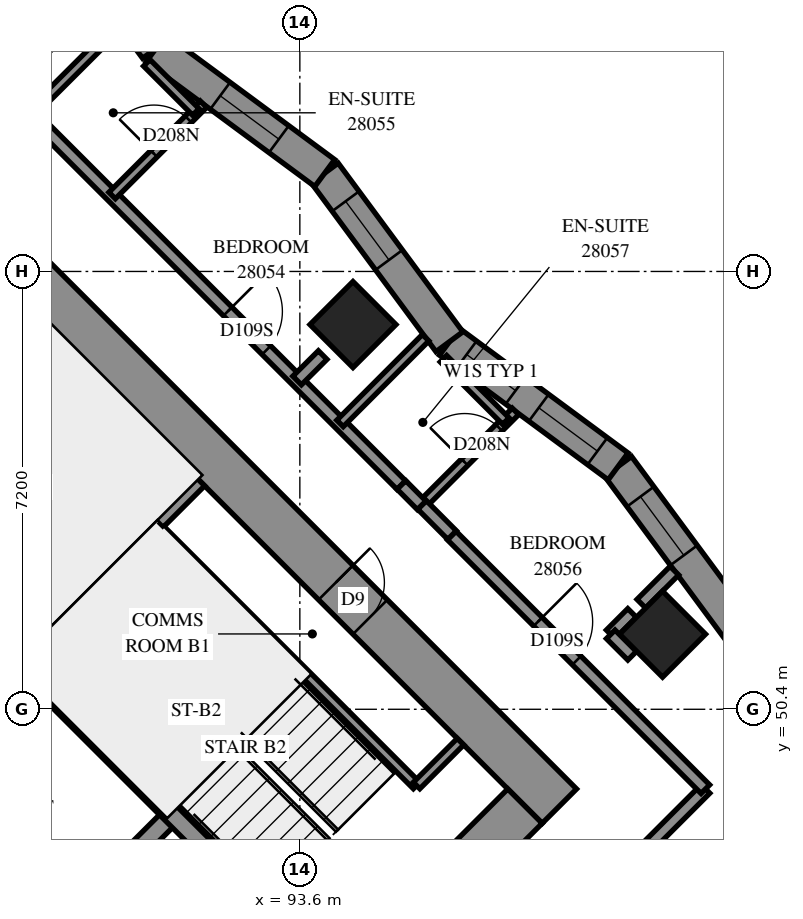
"""IFC4 building model, lengths in metres.
Left out: names, types, materials, properties, quantities, classifications, styles, units other than length and angle.
Written with IfcOpenShell. Run it as: python <this file> out.ifc"""

import sys

from ifc_helpers import new_model, si_unit, direction, frame, frame_2d, origin, origin_2d, place, context, subcontext, project, spatial, polyline, rectangle, outline, extrude, element, fill, save


model = new_model("IFC4")
c1 = context("Model", 3, precision=1e-05, world=origin(), true_north=direction((0.0, 1.0)))
c2 = subcontext(c1, "Body", "Model", "MODEL_VIEW")
j1 = project(units=[si_unit("LENGTHUNIT", "METRE"), si_unit("PLANEANGLEUNIT", "RADIAN")], contexts=[c1])
p1 = place(None, origin())
s1 = spatial("IfcSite", under=j1, at=p1, CompositionType="ELEMENT")
p2 = place(p1, origin())
s2 = spatial("IfcBuilding", under=s1, at=p2, CompositionType="ELEMENT")
p3 = place(p2, frame((0.0, 0.0, 105.0)))
s3 = spatial("IfcBuildingStorey", under=s2, at=p3, CompositionType="ELEMENT", Elevation=105.0)
for number, where, z_axis, x_axis in (
    (1, (89.382, 61.818, 0.0), (0.0, 0.0, 1.0), (0.707, -0.707, 0.0)),
    (2, (94.474, 56.727, 0.0), (0.0, 0.0, 1.0), (0.707, -0.707, 0.0)),
    (3, (99.565, 51.635, 0.0), (0.0, 0.0, 1.0), (0.707, -0.707, 0.0)),
):
    element("IfcColumn", number, at=place(p3, frame(where, z_axis=z_axis, x_axis=x_axis)), inside=s3, PredefinedType="COLUMN", context=c2, shape_type="SweptSolid", body=[
        extrude(rectangle(XDim=1.0, YDim=1.0, at=origin_2d()), origin(), (0.0, 0.0, 1.0), 3.1),
    ])
p4 = place(p3, frame((86.554, 60.121, -0.3), z_axis=(0.0, 0.0, 1.0), x_axis=(0.7071067812, -0.7071067812, 0.0)))
e4 = element("IfcWall", 4, at=p4, inside=s3, PredefinedType="SHEAR", context=c2, shape_type="SweptSolid", body=[
    extrude(rectangle(XDim=16.0, YDim=0.8, at=frame_2d((8.0, 0.0))), origin(), (0.0, 0.0, 1.0), 2.7),
])
p5 = place(p4, frame((10.8, 0.0, 0.3)))
e5 = element("IfcOpeningElement", 5, at=p5, cuts=e4, PredefinedType="OPENING", context=c2, shape_type="SweptSolid", body=[
    extrude(rectangle(XDim=0.8, YDim=2.1, at=frame_2d((0.4, 1.05))), frame((0.0, 0.41, 0.0), z_axis=(0.0, -1.0, 0.0), x_axis=(1.0, 0.0, 0.0)), (0.0, 0.0, 1.0), 0.82),
])
p6 = place(p3, frame((87.12, 38.625, -0.3), z_axis=(0.0, 0.0, 1.0), x_axis=(0.7071067812, 0.7071067812, 0.0)))
e6 = element("IfcWall", 6, at=p6, inside=s3, PredefinedType="SHEAR", context=c2, shape_type="SweptSolid", body=[
    extrude(rectangle(XDim=14.4, YDim=0.8, at=frame_2d((7.2, 0.0))), origin(), (0.0, 0.0, 1.0), 2.7),
])
p7 = place(p6, frame((4.55, 0.0, 0.3)))
e7 = element("IfcOpeningElement", 7, at=p7, cuts=e6, PredefinedType="OPENING", context=c2, shape_type="SweptSolid", body=[
    extrude(rectangle(XDim=1.1, YDim=2.1, at=frame_2d((0.55, 1.05))), frame((0.0, 0.41, 0.0), z_axis=(0.0, -1.0, 0.0), x_axis=(1.0, 0.0, 0.0)), (0.0, 0.0, 1.0), 0.82),
])
p8 = place(p6, frame((11.35, 0.0, 0.3)))
e8 = element("IfcOpeningElement", 8, at=p8, cuts=e6, PredefinedType="OPENING", context=c2, shape_type="SweptSolid", body=[
    extrude(rectangle(XDim=1.1, YDim=2.1, at=frame_2d((0.55, 1.05))), frame((0.0, 0.41, 0.0), z_axis=(0.0, -1.0, 0.0), x_axis=(1.0, 0.0, 0.0)), (0.0, 0.0, 1.0), 0.82),
])
p9 = place(p3, frame((89.17, 46.332, 0.0), z_axis=(0.0, 0.0, 1.0), x_axis=(0.7071067812, 0.7071067812, 0.0)))
e9 = element("IfcWall", 9, at=p9, inside=s3, PredefinedType="SOLIDWALL", context=c2, shape_type="SweptSolid", body=[
    extrude(rectangle(XDim=3.3, YDim=0.3, at=frame_2d((1.65, 0.0))), origin(), (0.0, 0.0, 1.0), 3.1),
])
p10 = place(p3, frame((81.534, 53.969, 0.0), z_axis=(0.0, 0.0, 1.0), x_axis=(0.707103309, -0.7071102534, 0.0)))
e10 = element("IfcWall", 10, at=p10, inside=s3, PredefinedType="SOLIDWALL", context=c2, shape_type="SweptSolid", body=[
    extrude(rectangle(XDim=14.4, YDim=0.3, at=frame_2d((7.2, 0.0))), origin(), (0.0, 0.0, 1.0), 3.1),
])
p11 = place(p10, frame((12.05, 0.0, 0.0)))
e11 = element("IfcOpeningElement", 11, at=p11, cuts=e10, PredefinedType="OPENING", context=c2, shape_type="SweptSolid", body=[
    extrude(rectangle(XDim=1.1, YDim=2.1, at=frame_2d((0.55, 1.05))), frame((0.0, 0.16, 0.0), z_axis=(0.0, -1.0, 0.0), x_axis=(1.0, 0.0, 0.0)), (0.0, 0.0, 1.0), 0.32),
])
p12 = place(p3, frame((88.958, 51.211, 0.0), z_axis=(0.0, 0.0, 1.0), x_axis=(0.7070998367, -0.7071137256, 0.0)))
e12 = element("IfcWall", 12, at=p12, inside=s3, PredefinedType="SOLIDWALL", context=c2, shape_type="SweptSolid", body=[
    extrude(rectangle(XDim=7.2, YDim=0.3, at=frame_2d((3.6, 0.0))), origin(), (0.0, 0.0, 1.0), 3.1),
])
p13 = place(p3, frame((88.958, 51.211, 0.0), z_axis=(0.0, 0.0, 1.0), x_axis=(0.7071067812, 0.7071067812, 0.0)))
e13 = element("IfcWall", 13, at=p13, inside=s3, PredefinedType="SOLIDWALL", context=c2, shape_type="SweptSolid", body=[
    extrude(rectangle(XDim=4.2, YDim=0.3, at=frame_2d((2.1, 0.0))), origin(), (0.0, 0.0, 1.0), 3.1),
])
p14 = place(p3, frame((100.884, 51.62, 0.0), z_axis=(0.0, 0.0, 1.0), x_axis=(-0.5943168833, 0.8042309632, 0.0)))
e14 = element("IfcWall", 14, at=p14, inside=s3, PredefinedType="SOLIDWALL", context=c2, shape_type="SweptSolid", body=[
    extrude(outline(polyline([(0.041, -0.275), (3.491, -0.275), (3.408, 0.275), (-0.041, 0.275), (0.041, -0.275)])), origin(), (0.0, 0.0, 1.0), 3.1),
])
p15 = place(p14, frame((1.631, 0.0, 0.5)))
e15 = element("IfcOpeningElement", 15, at=p15, cuts=e14, PredefinedType="OPENING", context=c2, shape_type="SweptSolid", body=[
    extrude(rectangle(XDim=1.2, YDim=2.45, at=frame_2d((0.6, 1.225))), frame((0.0, 0.285, 0.0), z_axis=(0.0, -1.0, 0.0), x_axis=(1.0, 0.0, 0.0)), (0.0, 0.0, 1.0), 0.57),
])
p16 = place(p3, frame((98.834, 54.394, 0.0), z_axis=(0.0, 0.0, 1.0), x_axis=(-0.8042309632, 0.5943168833, 0.0)))
e16 = element("IfcWall", 16, at=p16, inside=s3, PredefinedType="SOLIDWALL", context=c2, shape_type="SweptSolid", body=[
    extrude(outline(polyline([(-0.041, -0.275), (3.408, -0.275), (3.491, 0.275), (0.041, 0.275), (-0.041, -0.275)])), origin(), (0.0, 0.0, 1.0), 3.1),
])
p17 = place(p16, frame((0.422, 0.0, 0.5)))
e17 = element("IfcOpeningElement", 17, at=p17, cuts=e16, PredefinedType="OPENING", context=c2, shape_type="SweptSolid", body=[
    extrude(rectangle(XDim=1.2, YDim=2.45, at=frame_2d((0.6, 1.225))), frame((0.0, 0.285, 0.0), z_axis=(0.0, -1.0, 0.0), x_axis=(1.0, 0.0, 0.0)), (0.0, 0.0, 1.0), 0.57),
])
p18 = place(p16, frame((2.097, 0.0, 0.45)))
e18 = element("IfcOpeningElement", 18, at=p18, cuts=e16, PredefinedType="OPENING", context=c2, shape_type="SweptSolid", body=[
    extrude(rectangle(XDim=1.0, YDim=2.5, at=frame_2d((0.5, 1.25))), frame((0.0, 0.285, 0.0), z_axis=(0.0, -1.0, 0.0), x_axis=(1.0, 0.0, 0.0)), (0.0, 0.0, 1.0), 0.57),
])
p19 = place(p3, frame((96.06, 56.444, 0.0), z_axis=(0.0, 0.0, 1.0), x_axis=(-0.5943307397, 0.8042207234, 0.0)))
e19 = element("IfcWall", 19, at=p19, inside=s3, PredefinedType="SOLIDWALL", context=c2, shape_type="SweptSolid", body=[
    extrude(outline(polyline([(0.041, -0.275), (3.491, -0.275), (3.408, 0.275), (-0.041, 0.275), (0.041, -0.275)])), origin(), (0.0, 0.0, 1.0), 3.1),
])
p20 = place(p19, frame((1.672, 0.0, 0.5)))
e20 = element("IfcOpeningElement", 20, at=p20, cuts=e19, PredefinedType="OPENING", context=c2, shape_type="SweptSolid", body=[
    extrude(rectangle(XDim=1.2, YDim=2.45, at=frame_2d((0.6, 1.225))), frame((0.0, 0.285, 0.0), z_axis=(0.0, -1.0, 0.0), x_axis=(1.0, 0.0, 0.0)), (0.0, 0.0, 1.0), 0.57),
])
p21 = place(p3, frame((94.01, 59.218, 0.0), z_axis=(0.0, 0.0, 1.0), x_axis=(-0.8042207234, 0.5943307397, 0.0)))
e21 = element("IfcWall", 21, at=p21, inside=s3, PredefinedType="SOLIDWALL", context=c2, shape_type="SweptSolid", body=[
    extrude(outline(polyline([(-0.041, -0.275), (3.408, -0.275), (3.491, 0.275), (0.041, 0.275), (-0.041, -0.275)])), origin(), (0.0, 0.0, 1.0), 3.1),
])
p22 = place(p21, frame((0.938, 0.0, 0.5)))
e22 = element("IfcOpeningElement", 22, at=p22, cuts=e21, PredefinedType="OPENING", context=c2, shape_type="SweptSolid", body=[
    extrude(rectangle(XDim=1.2, YDim=2.45, at=frame_2d((0.6, 1.225))), frame((0.0, 0.285, 0.0), z_axis=(0.0, -1.0, 0.0), x_axis=(1.0, 0.0, 0.0)), (0.0, 0.0, 1.0), 0.57),
])
p23 = place(p3, frame((91.235, 61.268, 0.0), z_axis=(0.0, 0.0, 1.0), x_axis=(-0.5943168833, 0.8042309632, 0.0)))
e23 = element("IfcWall", 23, at=p23, inside=s3, PredefinedType="SOLIDWALL", context=c2, shape_type="SweptSolid", body=[
    extrude(outline(polyline([(0.041, -0.275), (3.491, -0.275), (3.408, 0.275), (-0.041, 0.275), (0.041, -0.275)])), origin(), (0.0, 0.0, 1.0), 3.1),
])
p24 = place(p23, frame((1.863, 0.0, 0.5)))
e24 = element("IfcOpeningElement", 24, at=p24, cuts=e23, PredefinedType="OPENING", context=c2, shape_type="SweptSolid", body=[
    extrude(rectangle(XDim=1.2, YDim=2.45, at=frame_2d((0.6, 1.225))), frame((0.0, 0.285, 0.0), z_axis=(0.0, -1.0, 0.0), x_axis=(1.0, 0.0, 0.0)), (0.0, 0.0, 1.0), 0.57),
])
p25 = place(p23, frame((0.889, 0.0, 0.45)))
e25 = element("IfcOpeningElement", 25, at=p25, cuts=e23, PredefinedType="OPENING", context=c2, shape_type="SweptSolid", body=[
    extrude(rectangle(XDim=0.8, YDim=2.5, at=frame_2d((0.4, 1.25))), frame((0.0, 0.285, 0.0), z_axis=(0.0, -1.0, 0.0), x_axis=(1.0, 0.0, 0.0)), (0.0, 0.0, 1.0), 0.57),
])
p26 = place(p3, frame((91.313, 53.354, 0.0), z_axis=(0.0, 0.0, 1.0), x_axis=(0.7071067812, -0.7071067812, 0.0)))
e26 = element("IfcWall", 26, at=p26, inside=s3, PredefinedType="PARTITIONING", context=c2, shape_type="SweptSolid", body=[
    extrude(rectangle(XDim=5.95, YDim=0.15, at=frame_2d((2.975, 0.0))), origin(), (0.0, 0.0, 1.0), 3.1),
])
p27 = place(p3, frame((95.52, 49.146, 0.0), z_axis=(0.0, 0.0, 1.0), x_axis=(0.7071067812, 0.7071067812, 0.0)))
e27 = element("IfcWall", 27, at=p27, inside=s3, PredefinedType="PARTITIONING", context=c2, shape_type="SweptSolid", body=[
    extrude(rectangle(XDim=1.02, YDim=0.15, at=frame_2d((0.51, 0.0))), origin(), (0.0, 0.0, 1.0), 3.1),
])
p28 = place(p3, frame((94.331, 41.313, 0.0), z_axis=(0.0, 0.0, 1.0), x_axis=(0.7071109333, 0.7071026291, 0.0)))
e28 = element("IfcWall", 28, at=p28, inside=s3, PredefinedType="PARTITIONING", context=c2, shape_type="SweptSolid", body=[
    extrude(rectangle(XDim=12.042, YDim=0.2, at=frame_2d((6.021, 0.0))), origin(), (0.0, 0.0, 1.0), 3.1),
])
p29 = place(p3, frame((87.894, 61.461, 0.0), z_axis=(0.0, 0.0, 1.0), x_axis=(0.7071067812, -0.7071067812, 0.0)))
e29 = element("IfcWall", 29, at=p29, inside=s3, PredefinedType="PARTITIONING", context=c2, shape_type="SweptSolid", body=[
    extrude(rectangle(XDim=10.428, YDim=0.2, at=frame_2d((5.214, 0.0))), origin(), (0.0, 0.0, 1.0), 3.1),
])
p30 = place(p29, frame((6.39, 0.0, 0.0)))
e30 = element("IfcOpeningElement", 30, at=p30, cuts=e29, PredefinedType="OPENING", context=c2, shape_type="SweptSolid", body=[
    extrude(rectangle(XDim=0.9, YDim=2.1, at=frame_2d((0.45, 1.05))), frame((0.0, 0.11, 0.0), z_axis=(0.0, -1.0, 0.0), x_axis=(1.0, 0.0, 0.0)), (0.0, 0.0, 1.0), 0.22),
])
p31 = place(p3, frame((93.413, 42.233, 0.0), z_axis=(0.0, 0.0, 1.0), x_axis=(0.7071067812, 0.7071067812, 0.0)))
e31 = element("IfcWall", 31, at=p31, inside=s3, PredefinedType="PARTITIONING", context=c2, shape_type="SweptSolid", body=[
    extrude(rectangle(XDim=9.699, YDim=0.2, at=frame_2d((4.849, 0.0))), origin(), (0.0, 0.0, 1.0), 3.1),
])
p32 = place(p31, frame((0.249, 0.0, 0.0)))
e32 = element("IfcOpeningElement", 32, at=p32, cuts=e31, PredefinedType="OPENING", context=c2, shape_type="SweptSolid", body=[
    extrude(rectangle(XDim=1.0, YDim=2.1, at=frame_2d((0.5, 1.05))), frame((0.0, 0.11, 0.0), z_axis=(0.0, -1.0, 0.0), x_axis=(1.0, 0.0, 0.0)), (0.0, 0.0, 1.0), 0.22),
])
p33 = place(p3, frame((96.097, 53.258, 0.0), z_axis=(0.0, 0.0, 1.0), x_axis=(0.7071067812, -0.7071067812, 0.0)))
e33 = element("IfcWall", 33, at=p33, inside=s3, PredefinedType="PARTITIONING", context=c2, shape_type="SweptSolid", body=[
    extrude(rectangle(XDim=5.9, YDim=0.2, at=frame_2d((2.95, 0.0))), origin(), (0.0, 0.0, 1.0), 3.1),
])
p34 = place(p33, frame((2.006, 0.0, 0.0)))
e34 = element("IfcOpeningElement", 34, at=p34, cuts=e33, PredefinedType="OPENING", context=c2, shape_type="SweptSolid", body=[
    extrude(rectangle(XDim=0.9, YDim=2.1, at=frame_2d((0.45, 1.05))), frame((0.0, 0.11, 0.0), z_axis=(0.0, -1.0, 0.0), x_axis=(1.0, 0.0, 0.0)), (0.0, 0.0, 1.0), 0.22),
])
p35 = place(p3, frame((95.605, 53.759, 0.0), z_axis=(0.0, 0.0, 1.0), x_axis=(0.7071067812, 0.7071067812, 0.0)))
e35 = element("IfcWall", 35, at=p35, inside=s3, PredefinedType="PARTITIONING", context=c2, shape_type="SweptSolid", body=[
    extrude(rectangle(XDim=2.179, YDim=0.15, at=frame_2d((1.089, 0.0))), origin(), (0.0, 0.0, 1.0), 3.1),
])
p36 = place(p35, frame((0.997, 0.0, 0.0)))
e36 = element("IfcOpeningElement", 36, at=p36, cuts=e35, PredefinedType="OPENING", context=c2, shape_type="SweptSolid", body=[
    extrude(rectangle(XDim=0.8, YDim=2.1, at=frame_2d((0.4, 1.05))), frame((0.0, 0.085, 0.0), z_axis=(0.0, -1.0, 0.0), x_axis=(1.0, 0.0, 0.0)), (0.0, 0.0, 1.0), 0.17),
])
p37 = place(p3, frame((90.513, 58.849, 0.0), z_axis=(0.0, 0.0, 1.0), x_axis=(0.7071303251, 0.7070832365, 0.0)))
e37 = element("IfcWall", 37, at=p37, inside=s3, PredefinedType="PARTITIONING", context=c2, shape_type="SweptSolid", body=[
    extrude(rectangle(XDim=2.124, YDim=0.15, at=frame_2d((1.062, 0.0))), origin(), (0.0, 0.0, 1.0), 3.1),
])
p38 = place(p37, frame((0.972, 0.0, 0.0)))
e38 = element("IfcOpeningElement", 38, at=p38, cuts=e37, PredefinedType="OPENING", context=c2, shape_type="SweptSolid", body=[
    extrude(rectangle(XDim=0.8, YDim=2.1, at=frame_2d((0.4, 1.05))), frame((0.0, 0.085, 0.0), z_axis=(0.0, -1.0, 0.0), x_axis=(1.0, 0.0, 0.0)), (0.0, 0.0, 1.0), 0.17),
])
p39 = place(p3, frame((89.169, 60.193, 0.0), z_axis=(0.0, 0.0, 1.0), x_axis=(0.7076435955, 0.706569559, 0.0)))
e39 = element("IfcWall", 39, at=p39, inside=s3, PredefinedType="PARTITIONING", context=c2, shape_type="SweptSolid", body=[
    extrude(rectangle(XDim=2.048, YDim=0.15, at=frame_2d((1.024, 0.0))), origin(), (0.0, 0.0, 1.0), 3.1),
])
p40 = place(p3, frame((94.261, 55.101, 0.0), z_axis=(0.0, 0.0, 1.0), x_axis=(0.7065795114, 0.7076336581, 0.0)))
e40 = element("IfcWall", 40, at=p40, inside=s3, PredefinedType="PARTITIONING", context=c2, shape_type="SweptSolid", body=[
    extrude(rectangle(XDim=1.992, YDim=0.15, at=frame_2d((0.996, 0.0))), origin(), (0.0, 0.0, 1.0), 3.1),
])
p41 = place(p3, frame((95.961, 56.166, 0.0), z_axis=(0.0, 0.0, 1.0), x_axis=(0.7071067812, -0.7071067812, 0.0)))
e41 = element("IfcWall", 41, at=p41, inside=s3, PredefinedType="PARTITIONING", context=c2, shape_type="SweptSolid", body=[
    extrude(rectangle(XDim=1.451, YDim=0.15, at=frame_2d((0.726, 0.0))), origin(), (0.0, 0.0, 1.0), 3.1),
])
p42 = place(p3, frame((91.083, 61.03, 0.0), z_axis=(0.0, 0.0, 1.0), x_axis=(0.7071067812, -0.7071067812, 0.0)))
e42 = element("IfcWall", 42, at=p42, inside=s3, PredefinedType="PARTITIONING", context=c2, shape_type="SweptSolid", body=[
    extrude(rectangle(XDim=1.141, YDim=0.15, at=frame_2d((0.57, 0.0))), origin(), (0.0, 0.0, 1.0), 3.1),
])
p43 = place(p3, frame((99.216, 52.136, 0.0), z_axis=(0.0, 0.0, 1.0), x_axis=(0.7071067812, 0.7071067812, 0.0)))
e43 = element("IfcWall", 43, at=p43, inside=s3, PredefinedType="PARTITIONING", context=c2, shape_type="SweptSolid", body=[
    extrude(rectangle(XDim=0.768, YDim=0.2, at=frame_2d((0.384, 0.0))), origin(), (0.0, 0.0, 1.0), 3.1),
])
p44 = place(p3, frame((95.609, 53.761, 0.0), z_axis=(0.0, 0.0, 1.0), x_axis=(0.7056768426, -0.7085338339, 0.0)))
e44 = element("IfcWall", 44, at=p44, inside=s3, PredefinedType="PARTITIONING", context=c2, shape_type="SweptSolid", body=[
    extrude(rectangle(XDim=0.7, YDim=0.2, at=frame_2d((0.35, 0.0))), origin(), (0.0, 0.0, 1.0), 3.1),
])
p45 = place(p3, frame((93.555, 55.807, 0.0), z_axis=(0.0, 0.0, 1.0), x_axis=(0.7087923682, 0.7054171665, 0.0)))
e45 = element("IfcWall", 45, at=p45, inside=s3, PredefinedType="PARTITIONING", context=c2, shape_type="SweptSolid", body=[
    extrude(rectangle(XDim=0.593, YDim=0.2, at=frame_2d((0.296, 0.0))), origin(), (0.0, 0.0, 1.0), 3.1),
])
for number, where, z_axis, x_axis in (
    (46, (98.712, 51.632, 0.0), (0.0, 0.0, 1.0), (0.707, 0.707, 0.0)),
    (47, (98.713, 51.633, 0.0), (0.0, 0.0, 1.0), (0.707, -0.707, 0.0)),
):
    element("IfcWall", number, at=place(p3, frame(where, z_axis=z_axis, x_axis=x_axis)), inside=s3, PredefinedType="PARTITIONING", context=c2, shape_type="SweptSolid", body=[
        extrude(rectangle(XDim=0.498, YDim=0.2, at=frame_2d((0.249, 0.0))), origin(), (0.0, 0.0, 1.0), 3.1),
    ])
p46 = place(p3, frame((95.271, 54.089, 0.0), z_axis=(0.0, 0.0, 1.0), x_axis=(0.7049801586, -0.7092270271, 0.0)))
e48 = element("IfcWall", 48, at=p46, inside=s3, PredefinedType="PARTITIONING", context=c2, shape_type="SweptSolid", body=[
    extrude(rectangle(XDim=0.471, YDim=0.2, at=frame_2d((0.235, 0.0))), origin(), (0.0, 0.0, 1.0), 3.1),
])
p47 = place(p15, origin())
e49 = element("IfcWindow", 49, at=p47, inside=s3, PartitioningType="SINGLE_PANEL", PredefinedType="WINDOW", context=c2, shape_type="SweptSolid", body=[
    extrude(rectangle(XDim=1.2, YDim=2.45, at=frame_2d((0.6, 1.225))), frame((0.0, 0.155, 0.0), z_axis=(0.0, -1.0, 0.0), x_axis=(1.0, 0.0, 0.0)), (0.0, 0.0, 1.0), 0.06),
])
fill(e15, e49)
p48 = place(p20, origin())
e50 = element("IfcWindow", 50, at=p48, inside=s3, PartitioningType="SINGLE_PANEL", PredefinedType="WINDOW", context=c2, shape_type="SweptSolid", body=[
    extrude(rectangle(XDim=1.2, YDim=2.45, at=frame_2d((0.6, 1.225))), frame((0.0, 0.155, 0.0), z_axis=(0.0, -1.0, 0.0), x_axis=(1.0, 0.0, 0.0)), (0.0, 0.0, 1.0), 0.06),
])
fill(e20, e50)
p49 = place(p22, origin())
e51 = element("IfcWindow", 51, at=p49, inside=s3, PartitioningType="SINGLE_PANEL", PredefinedType="WINDOW", context=c2, shape_type="SweptSolid", body=[
    extrude(rectangle(XDim=1.2, YDim=2.45, at=frame_2d((0.6, 1.225))), frame((0.0, 0.155, 0.0), z_axis=(0.0, -1.0, 0.0), x_axis=(1.0, 0.0, 0.0)), (0.0, 0.0, 1.0), 0.06),
])
fill(e22, e51)
p50 = place(p5, origin())
e52 = element("IfcDoor", 52, at=p50, inside=s3, OperationType="SINGLE_SWING_RIGHT", PredefinedType="DOOR", context=c2, shape_type="SweptSolid", body=[
    extrude(rectangle(XDim=0.8, YDim=2.1, at=frame_2d((0.4, 1.05))), frame((0.0, -0.34, 0.0), z_axis=(0.0, -1.0, 0.0), x_axis=(1.0, 0.0, 0.0)), (0.0, 0.0, 1.0), 0.05),
])
fill(e5, e52)
p51 = place(p30, origin())
e53 = element("IfcDoor", 53, at=p51, inside=s3, OperationType="SINGLE_SWING_LEFT", PredefinedType="DOOR", context=c2, shape_type="SweptSolid", body=[
    extrude(rectangle(XDim=0.9, YDim=2.1, at=frame_2d((0.45, 1.05))), frame((0.0, 0.025, 0.0), z_axis=(0.0, -1.0, 0.0), x_axis=(1.0, 0.0, 0.0)), (0.0, 0.0, 1.0), 0.05),
])
fill(e30, e53)
p52 = place(p38, origin())
e54 = element("IfcDoor", 54, at=p52, inside=s3, OperationType="SINGLE_SWING_RIGHT", PredefinedType="DOOR", context=c2, shape_type="SweptSolid", body=[
    extrude(rectangle(XDim=0.8, YDim=2.1, at=frame_2d((0.4, 1.05))), frame((0.0, 0.025, 0.0), z_axis=(0.0, -1.0, 0.0), x_axis=(1.0, 0.0, 0.0)), (0.0, 0.0, 1.0), 0.05),
])
fill(e38, e54)
p53 = place(p34, origin())
e55 = element("IfcDoor", 55, at=p53, inside=s3, OperationType="SINGLE_SWING_LEFT", PredefinedType="DOOR", context=c2, shape_type="SweptSolid", body=[
    extrude(rectangle(XDim=0.9, YDim=2.1, at=frame_2d((0.45, 1.05))), frame((0.0, 0.025, 0.0), z_axis=(0.0, -1.0, 0.0), x_axis=(1.0, 0.0, 0.0)), (0.0, 0.0, 1.0), 0.05),
])
fill(e34, e55)
p54 = place(p36, origin())
e56 = element("IfcDoor", 56, at=p54, inside=s3, OperationType="SINGLE_SWING_RIGHT", PredefinedType="DOOR", context=c2, shape_type="SweptSolid", body=[
    extrude(rectangle(XDim=0.8, YDim=2.1, at=frame_2d((0.4, 1.05))), frame((0.0, 0.025, 0.0), z_axis=(0.0, -1.0, 0.0), x_axis=(1.0, 0.0, 0.0)), (0.0, 0.0, 1.0), 0.05),
])
fill(e36, e56)
p55 = place(p17, origin())
e57 = element("IfcWindow", 57, at=p55, inside=s3, PartitioningType="SINGLE_PANEL", PredefinedType="WINDOW", context=c2, shape_type="SweptSolid", body=[
    extrude(rectangle(XDim=1.2, YDim=2.45, at=frame_2d((0.6, 1.225))), frame((0.0, 0.155, 0.0), z_axis=(0.0, -1.0, 0.0), x_axis=(1.0, 0.0, 0.0)), (0.0, 0.0, 1.0), 0.06),
])
fill(e17, e57)
p56 = place(p18, origin())
e58 = element("IfcWindow", 58, at=p56, inside=s3, PartitioningType="SINGLE_PANEL", PredefinedType="WINDOW", context=c2, shape_type="SweptSolid", body=[
    extrude(rectangle(XDim=1.0, YDim=2.5, at=frame_2d((0.5, 1.25))), frame((0.0, 0.155, 0.0), z_axis=(0.0, -1.0, 0.0), x_axis=(1.0, 0.0, 0.0)), (0.0, 0.0, 1.0), 0.06),
])
fill(e18, e58)
save(model, sys.argv[1])
